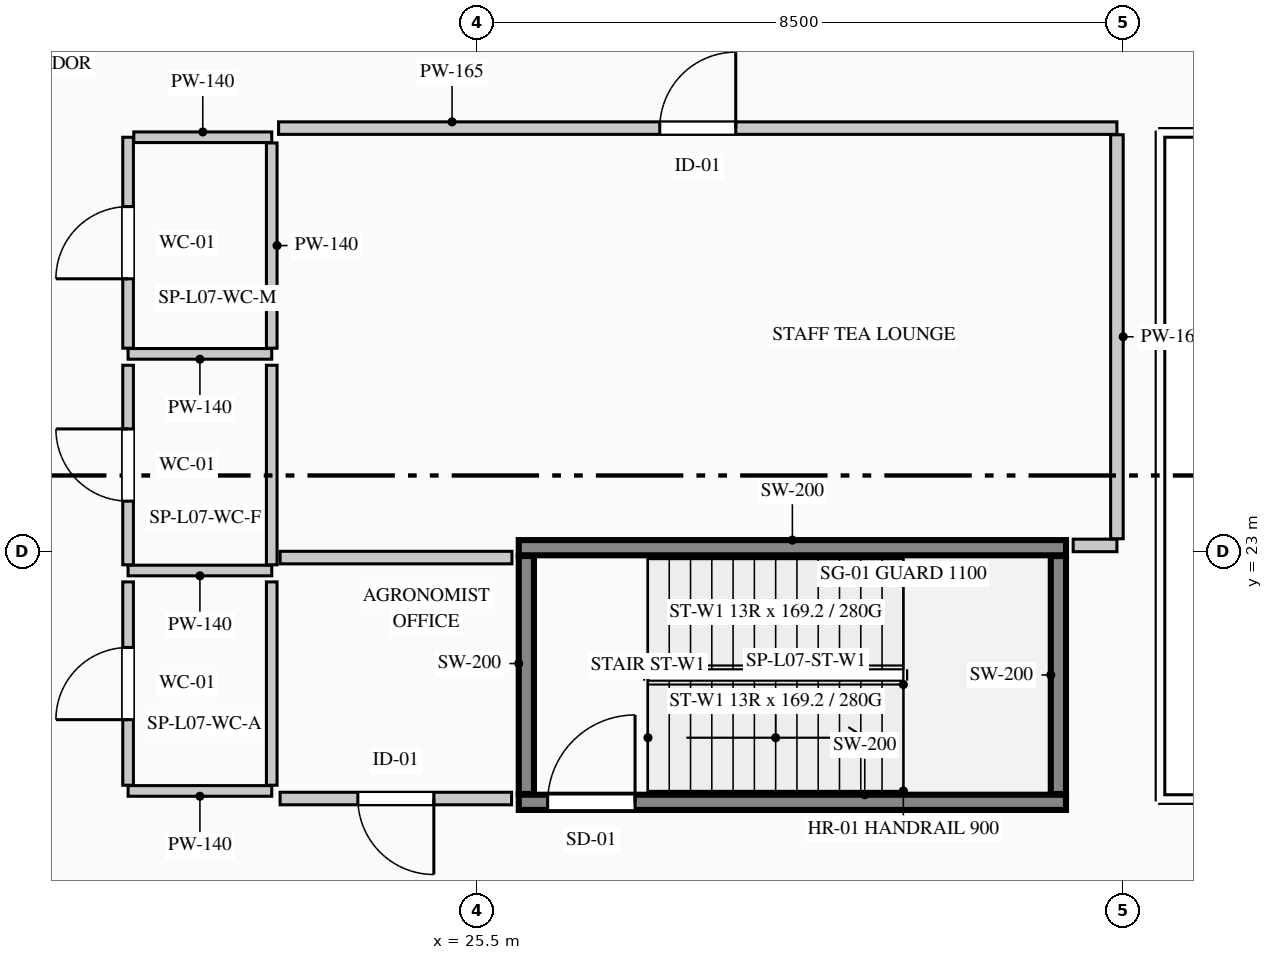
"""IFC4 building model, lengths in metres.
Left out: names, types, materials, properties, quantities, classifications, styles, units other than length and angle.
Written with IfcOpenShell. Run it as: python <this file> out.ifc"""

import sys

from ifc_helpers import new_model, si_unit, direction, frame, frame_2d, origin, place, context, subcontext, project, spatial, rectangle, extrude, element, fill, save


model = new_model("IFC4")
c1 = context("Model", 3, precision=1e-05, world=origin(), true_north=direction((0.0, 1.0)))
c2 = subcontext(c1, "Body", "Model", "MODEL_VIEW")
j1 = project(units=[si_unit("LENGTHUNIT", "METRE"), si_unit("PLANEANGLEUNIT", "RADIAN")], contexts=[c1])
p1 = place(None, origin())
s1 = spatial("IfcSite", under=j1, at=p1, CompositionType="ELEMENT")
p2 = place(p1, origin())
s2 = spatial("IfcBuilding", under=s1, at=p2, CompositionType="ELEMENT")
p3 = place(p2, frame((0.0, 0.0, 31.4)))
s3 = spatial("IfcBuildingStorey", under=s2, at=p3, CompositionType="ELEMENT", Elevation=31.4)
p4 = place(p3, frame((26.05, 19.7, 0.0), z_axis=(0.0, 0.0, 1.0), x_axis=(1.0, 0.0, 0.0)))
e1 = element("IfcWall", 1, at=p4, inside=s3, PredefinedType="SHEAR", context=c2, shape_type="SweptSolid", body=[
    extrude(rectangle(XDim=7.2, YDim=0.2, at=frame_2d((3.6, 0.0))), origin(), (0.0, 0.0, 1.0), 4.4),
])
p5 = place(p4, frame((0.38, 0.0, 0.0)))
e2 = element("IfcOpeningElement", 2, at=p5, cuts=e1, PredefinedType="OPENING", context=c2, shape_type="SweptSolid", body=[
    extrude(rectangle(XDim=1.15, YDim=2.2, at=frame_2d((0.575, 1.1))), frame((0.0, 0.11, 0.0), z_axis=(0.0, -1.0, 0.0), x_axis=(1.0, 0.0, 0.0)), (0.0, 0.0, 1.0), 0.22),
])
p6 = place(p3, frame((26.05, 23.05, 0.0), z_axis=(0.0, 0.0, 1.0), x_axis=(1.0, 0.0, 0.0)))
e3 = element("IfcWall", 3, at=p6, inside=s3, PredefinedType="SHEAR", context=c2, shape_type="SweptSolid", body=[
    extrude(rectangle(XDim=7.2, YDim=0.2, at=frame_2d((3.6, 0.0))), origin(), (0.0, 0.0, 1.0), 4.4),
])
for number, where, z_axis, x_axis in (
    (4, (26.15, 19.81, 0.0), (0.0, 0.0, 1.0), (0.0, 1.0, 0.0)),
    (5, (33.15, 19.81, 0.0), (0.0, 0.0, 1.0), (0.0, 1.0, 0.0)),
):
    element("IfcWall", number, at=place(p3, frame(where, z_axis=z_axis, x_axis=x_axis)), inside=s3, PredefinedType="SHEAR", context=c2, shape_type="SweptSolid", body=[
        extrude(rectangle(XDim=3.13, YDim=0.2, at=frame_2d((1.565, 0.0))), origin(), (0.0, 0.0, 1.0), 4.4),
    ])
p7 = place(p3, frame((22.8, 25.6, 0.0), z_axis=(0.0, 0.0, 1.0), x_axis=(-1.0, 0.0, 0.0)))
e6 = element("IfcWall", 6, at=p7, inside=s3, PredefinedType="PARTITIONING", context=c2, shape_type="SweptSolid", body=[
    extrude(rectangle(XDim=1.89, YDim=0.14, at=frame_2d((0.945, 0.0))), origin(), (0.0, 0.0, 1.0), 4.1),
])
p8 = place(p3, frame((20.91, 25.675, 0.0), z_axis=(0.0, 0.0, 1.0), x_axis=(0.0, 1.0, 0.0)))
e7 = element("IfcWall", 7, at=p8, inside=s3, PredefinedType="PARTITIONING", context=c2, shape_type="SweptSolid", body=[
    extrude(rectangle(XDim=2.775, YDim=0.14, at=frame_2d((1.387, 0.0))), origin(), (0.0, 0.0, 1.0), 4.1),
])
p9 = place(p8, frame((0.913, 0.0, 0.0)))
e8 = element("IfcOpeningElement", 8, at=p9, cuts=e7, PredefinedType="OPENING", context=c2, shape_type="SweptSolid", body=[
    extrude(rectangle(XDim=0.95, YDim=2.15, at=frame_2d((0.475, 1.075))), frame((0.0, 0.08, 0.0), z_axis=(0.0, -1.0, 0.0), x_axis=(1.0, 0.0, 0.0)), (0.0, 0.0, 1.0), 0.16),
])
p10 = place(p3, frame((20.985, 28.45, 0.0), z_axis=(0.0, 0.0, 1.0), x_axis=(1.0, 0.0, 0.0)))
e9 = element("IfcWall", 9, at=p10, inside=s3, PredefinedType="PARTITIONING", context=c2, shape_type="SweptSolid", body=[
    extrude(rectangle(XDim=1.815, YDim=0.14, at=frame_2d((0.907, 0.0))), origin(), (0.0, 0.0, 1.0), 4.1),
])
p11 = place(p3, frame((22.8, 28.375, 0.0), z_axis=(0.0, 0.0, 1.0), x_axis=(0.0, -1.0, 0.0)))
e10 = element("IfcWall", 10, at=p11, inside=s3, PredefinedType="PARTITIONING", context=c2, shape_type="SweptSolid", body=[
    extrude(rectangle(XDim=2.7, YDim=0.14, at=frame_2d((1.35, 0.0))), origin(), (0.0, 0.0, 1.0), 3.725),
])
p12 = place(p3, frame((22.8, 22.75, 0.0), z_axis=(0.0, 0.0, 1.0), x_axis=(-1.0, 0.0, 0.0)))
e11 = element("IfcWall", 11, at=p12, inside=s3, PredefinedType="PARTITIONING", context=c2, shape_type="SweptSolid", body=[
    extrude(rectangle(XDim=1.89, YDim=0.14, at=frame_2d((0.945, 0.0))), origin(), (0.0, 0.0, 1.0), 4.1),
])
p13 = place(p3, frame((20.91, 22.825, 0.0), z_axis=(0.0, 0.0, 1.0), x_axis=(0.0, 1.0, 0.0)))
e12 = element("IfcWall", 12, at=p13, inside=s3, PredefinedType="PARTITIONING", context=c2, shape_type="SweptSolid", body=[
    extrude(rectangle(XDim=2.625, YDim=0.14, at=frame_2d((1.312, 0.0))), origin(), (0.0, 0.0, 1.0), 4.1),
])
p14 = place(p13, frame((0.837, 0.0, 0.0)))
e13 = element("IfcOpeningElement", 13, at=p14, cuts=e12, PredefinedType="OPENING", context=c2, shape_type="SweptSolid", body=[
    extrude(rectangle(XDim=0.95, YDim=2.15, at=frame_2d((0.475, 1.075))), frame((0.0, 0.08, 0.0), z_axis=(0.0, -1.0, 0.0), x_axis=(1.0, 0.0, 0.0)), (0.0, 0.0, 1.0), 0.16),
])
p15 = place(p3, frame((22.8, 25.45, 0.0), z_axis=(0.0, 0.0, 1.0), x_axis=(0.0, -1.0, 0.0)))
e14 = element("IfcWall", 14, at=p15, inside=s3, PredefinedType="PARTITIONING", context=c2, shape_type="SweptSolid", body=[
    extrude(rectangle(XDim=2.625, YDim=0.14, at=frame_2d((1.312, 0.0))), origin(), (0.0, 0.0, 1.0), 3.725),
])
p16 = place(p3, frame((22.8, 19.85, 0.0), z_axis=(0.0, 0.0, 1.0), x_axis=(-1.0, 0.0, 0.0)))
e15 = element("IfcWall", 15, at=p16, inside=s3, PredefinedType="PARTITIONING", context=c2, shape_type="SweptSolid", body=[
    extrude(rectangle(XDim=1.89, YDim=0.14, at=frame_2d((0.945, 0.0))), origin(), (0.0, 0.0, 1.0), 4.1),
])
p17 = place(p3, frame((20.91, 19.925, 0.0), z_axis=(0.0, 0.0, 1.0), x_axis=(0.0, 1.0, 0.0)))
e16 = element("IfcWall", 16, at=p17, inside=s3, PredefinedType="PARTITIONING", context=c2, shape_type="SweptSolid", body=[
    extrude(rectangle(XDim=2.675, YDim=0.14, at=frame_2d((1.337, 0.0))), origin(), (0.0, 0.0, 1.0), 4.1),
])
p18 = place(p17, frame((0.863, 0.0, 0.0)))
e17 = element("IfcOpeningElement", 17, at=p18, cuts=e16, PredefinedType="OPENING", context=c2, shape_type="SweptSolid", body=[
    extrude(rectangle(XDim=0.95, YDim=2.15, at=frame_2d((0.475, 1.075))), frame((0.0, 0.08, 0.0), z_axis=(0.0, -1.0, 0.0), x_axis=(1.0, 0.0, 0.0)), (0.0, 0.0, 1.0), 0.16),
])
p19 = place(p3, frame((22.8, 22.6, 0.0), z_axis=(0.0, 0.0, 1.0), x_axis=(0.0, -1.0, 0.0)))
e18 = element("IfcWall", 18, at=p19, inside=s3, PredefinedType="PARTITIONING", context=c2, shape_type="SweptSolid", body=[
    extrude(rectangle(XDim=2.675, YDim=0.14, at=frame_2d((1.337, 0.0))), origin(), (0.0, 0.0, 1.0), 3.725),
])
p20 = place(p3, frame((25.956, 19.75, 0.0), z_axis=(0.0, 0.0, 1.0), x_axis=(-1.0, 0.0, 0.0)))
e19 = element("IfcWall", 19, at=p20, inside=s3, PredefinedType="PARTITIONING", context=c2, shape_type="SweptSolid", body=[
    extrude(rectangle(XDim=3.046, YDim=0.165, at=frame_2d((1.523, 0.0))), origin(), (0.0, 0.0, 1.0), 4.1),
])
p21 = place(p20, frame((1.023, 0.0, 0.0)))
e20 = element("IfcOpeningElement", 20, at=p21, cuts=e19, PredefinedType="OPENING", context=c2, shape_type="SweptSolid", body=[
    extrude(rectangle(XDim=1.0, YDim=2.15, at=frame_2d((0.5, 1.075))), frame((0.0, 0.093, 0.0), z_axis=(0.0, -1.0, 0.0), x_axis=(1.0, 0.0, 0.0)), (0.0, 0.0, 1.0), 0.185),
])
p22 = place(p3, frame((22.91, 22.92, 0.0), z_axis=(0.0, 0.0, 1.0), x_axis=(1.0, 0.0, 0.0)))
e21 = element("IfcWall", 21, at=p22, inside=s3, PredefinedType="PARTITIONING", context=c2, shape_type="SweptSolid", body=[
    extrude(rectangle(XDim=3.051, YDim=0.165, at=frame_2d((1.525, 0.0))), origin(), (0.0, 0.0, 1.0), 4.1),
])
p23 = place(p3, frame((33.92, 23.08, 0.0), z_axis=(0.0, 0.0, 1.0), x_axis=(-1.0, 0.0, 0.0)))
e22 = element("IfcWall", 22, at=p23, inside=s3, PredefinedType="PARTITIONING", context=c2, shape_type="SweptSolid", body=[
    extrude(rectangle(XDim=0.575, YDim=0.165, at=frame_2d((0.288, 0.0))), origin(), (0.0, 0.0, 1.0), 4.1),
])
p24 = place(p3, frame((22.89, 28.57, 0.0), z_axis=(0.0, 0.0, 1.0), x_axis=(1.0, 0.0, 0.0)))
e23 = element("IfcWall", 23, at=p24, inside=s3, PredefinedType="PARTITIONING", context=c2, shape_type="SweptSolid", body=[
    extrude(rectangle(XDim=11.03, YDim=0.165, at=frame_2d((5.515, 0.0))), origin(), (0.0, 0.0, 1.0), 3.885),
])
p25 = place(p24, frame((5.015, 0.0, 0.0)))
e24 = element("IfcOpeningElement", 24, at=p25, cuts=e23, PredefinedType="OPENING", context=c2, shape_type="SweptSolid", body=[
    extrude(rectangle(XDim=1.0, YDim=2.15, at=frame_2d((0.5, 1.075))), frame((0.0, 0.093, 0.0), z_axis=(0.0, -1.0, 0.0), x_axis=(1.0, 0.0, 0.0)), (0.0, 0.0, 1.0), 0.185),
])
p26 = place(p3, frame((33.92, 28.482, 0.0), z_axis=(0.0, 0.0, 1.0), x_axis=(0.0, -1.0, 0.0)))
e25 = element("IfcWall", 25, at=p26, inside=s3, PredefinedType="PARTITIONING", context=c2, shape_type="SweptSolid", body=[
    extrude(rectangle(XDim=5.315, YDim=0.165, at=frame_2d((2.657, 0.0))), origin(), (0.0, 0.0, 1.0), 3.285),
])
p27 = place(p5, origin())
e26 = element("IfcDoor", 26, at=p27, inside=s3, OperationType="SINGLE_SWING_RIGHT", PredefinedType="DOOR", context=c2, shape_type="SweptSolid", body=[
    extrude(rectangle(XDim=1.15, YDim=2.2, at=frame_2d((0.575, 1.1))), frame((0.0, 0.025, 0.0), z_axis=(0.0, -1.0, 0.0), x_axis=(1.0, 0.0, 0.0)), (0.0, 0.0, 1.0), 0.05),
])
fill(e2, e26)
p28 = place(p9, origin())
e27 = element("IfcDoor", 27, at=p28, inside=s3, OperationType="SINGLE_SWING_LEFT", PredefinedType="DOOR", context=c2, shape_type="SweptSolid", body=[
    extrude(rectangle(XDim=0.95, YDim=2.15, at=frame_2d((0.475, 1.075))), frame((0.0, 0.025, 0.0), z_axis=(0.0, -1.0, 0.0), x_axis=(1.0, 0.0, 0.0)), (0.0, 0.0, 1.0), 0.05),
])
fill(e8, e27)
p29 = place(p14, origin())
e28 = element("IfcDoor", 28, at=p29, inside=s3, OperationType="SINGLE_SWING_RIGHT", PredefinedType="DOOR", context=c2, shape_type="SweptSolid", body=[
    extrude(rectangle(XDim=0.95, YDim=2.15, at=frame_2d((0.475, 1.075))), frame((0.0, 0.025, 0.0), z_axis=(0.0, -1.0, 0.0), x_axis=(1.0, 0.0, 0.0)), (0.0, 0.0, 1.0), 0.05),
])
fill(e13, e28)
p30 = place(p18, origin())
e29 = element("IfcDoor", 29, at=p30, inside=s3, OperationType="SINGLE_SWING_LEFT", PredefinedType="DOOR", context=c2, shape_type="SweptSolid", body=[
    extrude(rectangle(XDim=0.95, YDim=2.15, at=frame_2d((0.475, 1.075))), frame((0.0, 0.025, 0.0), z_axis=(0.0, -1.0, 0.0), x_axis=(1.0, 0.0, 0.0)), (0.0, 0.0, 1.0), 0.05),
])
fill(e17, e29)
p31 = place(p21, origin())
e30 = element("IfcDoor", 30, at=p31, inside=s3, OperationType="SINGLE_SWING_LEFT", PredefinedType="DOOR", context=c2, shape_type="SweptSolid", body=[
    extrude(rectangle(XDim=1.0, YDim=2.15, at=frame_2d((0.5, 1.075))), frame((0.0, 0.025, 0.0), z_axis=(0.0, -1.0, 0.0), x_axis=(1.0, 0.0, 0.0)), (0.0, 0.0, 1.0), 0.05),
])
fill(e20, e30)
p32 = place(p25, origin())
e31 = element("IfcDoor", 31, at=p32, inside=s3, OperationType="SINGLE_SWING_RIGHT", PredefinedType="DOOR", context=c2, shape_type="SweptSolid", body=[
    extrude(rectangle(XDim=1.0, YDim=2.15, at=frame_2d((0.5, 1.075))), frame((0.0, 0.025, 0.0), z_axis=(0.0, -1.0, 0.0), x_axis=(1.0, 0.0, 0.0)), (0.0, 0.0, 1.0), 0.05),
])
fill(e24, e31)
save(model, sys.argv[1])
